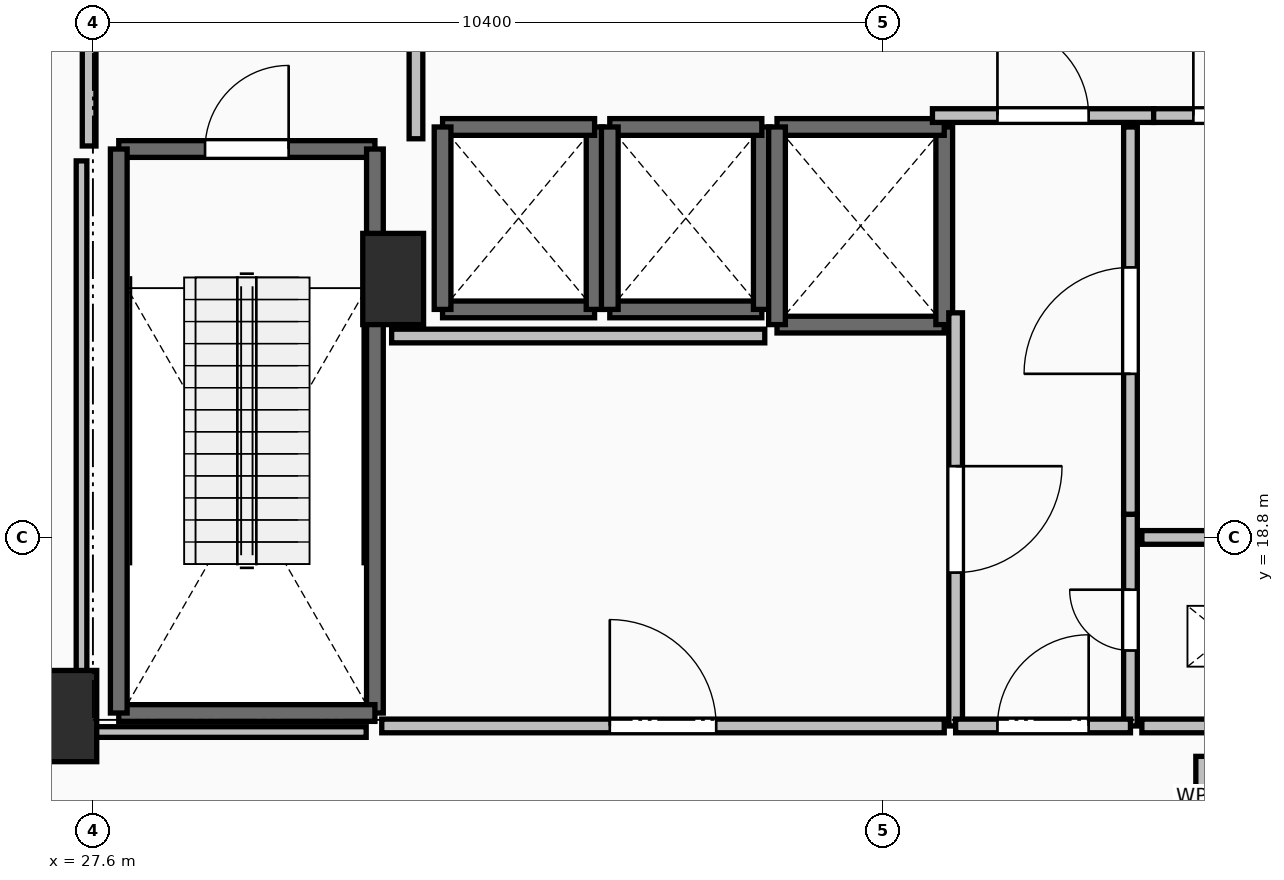
"""IFC4 building model, lengths in metres.
Left out: names, types, materials, properties, quantities, classifications, styles, units other than length and angle.
Written with IfcOpenShell. Run it as: python <this file> out.ifc"""

import sys

from ifc_helpers import new_model, si_unit, direction, frame, frame_2d, origin, origin_2d, place, context, subcontext, project, spatial, rectangle, extrude, element, fill, save


model = new_model("IFC4")
c1 = context("Model", 3, precision=1e-05, world=origin(), true_north=direction((0.0, 1.0)))
c2 = subcontext(c1, "Body", "Model", "MODEL_VIEW")
j1 = project(units=[si_unit("LENGTHUNIT", "METRE"), si_unit("PLANEANGLEUNIT", "RADIAN")], contexts=[c1])
p1 = place(None, origin())
s1 = spatial("IfcSite", under=j1, at=p1, CompositionType="ELEMENT")
p2 = place(p1, origin())
s2 = spatial("IfcBuilding", under=s1, at=p2, CompositionType="ELEMENT")
p3 = place(p2, frame((0.0, 0.0, 69.5)))
s3 = spatial("IfcBuildingStorey", under=s2, at=p3, CompositionType="ELEMENT", Elevation=69.5)
for number, where, z_axis, x_axis in (
    (1, (27.25, 16.45, 0.0), (0.0, 0.0, 1.0), (1.0, 0.0, 0.0)),
    (2, (31.55, 22.2, 0.0), (0.0, 0.0, 1.0), (1.0, 0.0, 0.0)),
):
    element("IfcColumn", number, at=place(p3, frame(where, z_axis=z_axis, x_axis=x_axis)), inside=s3, PredefinedType="PILASTER", context=c2, shape_type="SweptSolid", body=[
        extrude(rectangle(XDim=0.8, YDim=1.2, at=origin_2d()), origin(), (0.0, 0.0, 1.0), 4.8),
    ])
p4 = place(p3, frame((27.94, 23.91, 0.0), z_axis=(0.0, 0.0, 1.0), x_axis=(1.0, 0.0, 0.0)))
e3 = element("IfcWall", 3, at=p4, inside=s3, PredefinedType="SOLIDWALL", context=c2, shape_type="SweptSolid", body=[
    extrude(rectangle(XDim=3.37, YDim=0.22, at=frame_2d((1.685, 0.0))), origin(), (0.0, 0.0, 1.0), 4.5),
])
p5 = place(p4, frame((1.135, 0.0, 0.0)))
e4 = element("IfcOpeningElement", 4, at=p5, cuts=e3, PredefinedType="OPENING", context=c2, shape_type="SweptSolid", body=[
    extrude(rectangle(XDim=1.1, YDim=2.15, at=frame_2d((0.55, 1.075))), frame((0.0, 0.125, 0.0), z_axis=(0.0, -1.0, 0.0), x_axis=(1.0, 0.0, 0.0)), (0.0, 0.0, 1.0), 0.25),
])
p6 = place(p3, frame((31.31, 23.91, 0.0), z_axis=(0.0, 0.0, 1.0), x_axis=(0.0, -1.0, 0.0)))
e5 = element("IfcWall", 5, at=p6, inside=s3, PredefinedType="SOLIDWALL", context=c2, shape_type="SweptSolid", body=[
    extrude(rectangle(XDim=7.42, YDim=0.22, at=frame_2d((3.71, 0.0))), origin(), (0.0, 0.0, 1.0), 4.5),
])
p7 = place(p3, frame((31.31, 16.49, 0.0), z_axis=(0.0, 0.0, 1.0), x_axis=(-1.0, 0.0, 0.0)))
e6 = element("IfcWall", 6, at=p7, inside=s3, PredefinedType="SOLIDWALL", context=c2, shape_type="SweptSolid", body=[
    extrude(rectangle(XDim=3.37, YDim=0.22, at=frame_2d((1.685, 0.0))), origin(), (0.0, 0.0, 1.0), 4.5),
])
p8 = place(p3, frame((27.94, 16.49, 0.0), z_axis=(0.0, 0.0, 1.0), x_axis=(0.0, 1.0, 0.0)))
e7 = element("IfcWall", 7, at=p8, inside=s3, PredefinedType="SOLIDWALL", context=c2, shape_type="SweptSolid", body=[
    extrude(rectangle(XDim=7.42, YDim=0.22, at=frame_2d((3.71, 0.0))), origin(), (0.0, 0.0, 1.0), 4.5),
])
p9 = place(p3, frame((32.2, 21.8, 0.0), z_axis=(0.0, 0.0, 1.0), x_axis=(1.0, 0.0, 0.0)))
e8 = element("IfcWall", 8, at=p9, inside=s3, PredefinedType="SOLIDWALL", context=c2, shape_type="SweptSolid", body=[
    extrude(rectangle(XDim=2.0, YDim=0.22, at=frame_2d((1.0, 0.0))), origin(), (0.0, 0.0, 1.0), 4.5),
])
p10 = place(p3, frame((34.2, 21.8, 0.0), z_axis=(0.0, 0.0, 1.0), x_axis=(0.0, 1.0, 0.0)))
e9 = element("IfcWall", 9, at=p10, inside=s3, PredefinedType="SOLIDWALL", context=c2, shape_type="SweptSolid", body=[
    extrude(rectangle(XDim=2.4, YDim=0.22, at=frame_2d((1.2, 0.0))), origin(), (0.0, 0.0, 1.0), 4.5),
])
p11 = place(p3, frame((34.2, 24.2, 0.0), z_axis=(0.0, 0.0, 1.0), x_axis=(-1.0, 0.0, 0.0)))
e10 = element("IfcWall", 10, at=p11, inside=s3, PredefinedType="SOLIDWALL", context=c2, shape_type="SweptSolid", body=[
    extrude(rectangle(XDim=2.0, YDim=0.22, at=frame_2d((1.0, 0.0))), origin(), (0.0, 0.0, 1.0), 4.5),
])
p12 = place(p3, frame((32.2, 24.2, 0.0), z_axis=(0.0, 0.0, 1.0), x_axis=(0.0, -1.0, 0.0)))
e11 = element("IfcWall", 11, at=p12, inside=s3, PredefinedType="SOLIDWALL", context=c2, shape_type="SweptSolid", body=[
    extrude(rectangle(XDim=2.4, YDim=0.22, at=frame_2d((1.2, 0.0))), origin(), (0.0, 0.0, 1.0), 4.5),
])
p13 = place(p3, frame((34.4, 21.8, 0.0), z_axis=(0.0, 0.0, 1.0), x_axis=(1.0, 0.0, 0.0)))
e12 = element("IfcWall", 12, at=p13, inside=s3, PredefinedType="SOLIDWALL", context=c2, shape_type="SweptSolid", body=[
    extrude(rectangle(XDim=2.0, YDim=0.22, at=frame_2d((1.0, 0.0))), origin(), (0.0, 0.0, 1.0), 4.5),
])
p14 = place(p3, frame((36.4, 21.8, 0.0), z_axis=(0.0, 0.0, 1.0), x_axis=(0.0, 1.0, 0.0)))
e13 = element("IfcWall", 13, at=p14, inside=s3, PredefinedType="SOLIDWALL", context=c2, shape_type="SweptSolid", body=[
    extrude(rectangle(XDim=2.4, YDim=0.22, at=frame_2d((1.2, 0.0))), origin(), (0.0, 0.0, 1.0), 4.5),
])
p15 = place(p3, frame((36.4, 24.2, 0.0), z_axis=(0.0, 0.0, 1.0), x_axis=(-1.0, 0.0, 0.0)))
e14 = element("IfcWall", 14, at=p15, inside=s3, PredefinedType="SOLIDWALL", context=c2, shape_type="SweptSolid", body=[
    extrude(rectangle(XDim=2.0, YDim=0.22, at=frame_2d((1.0, 0.0))), origin(), (0.0, 0.0, 1.0), 4.5),
])
p16 = place(p3, frame((34.4, 24.2, 0.0), z_axis=(0.0, 0.0, 1.0), x_axis=(0.0, -1.0, 0.0)))
e15 = element("IfcWall", 15, at=p16, inside=s3, PredefinedType="SOLIDWALL", context=c2, shape_type="SweptSolid", body=[
    extrude(rectangle(XDim=2.4, YDim=0.22, at=frame_2d((1.2, 0.0))), origin(), (0.0, 0.0, 1.0), 4.5),
])
p17 = place(p3, frame((36.6, 21.6, 0.0), z_axis=(0.0, 0.0, 1.0), x_axis=(1.0, 0.0, 0.0)))
e16 = element("IfcWall", 16, at=p17, inside=s3, PredefinedType="SOLIDWALL", context=c2, shape_type="SweptSolid", body=[
    extrude(rectangle(XDim=2.2, YDim=0.22, at=frame_2d((1.1, 0.0))), origin(), (0.0, 0.0, 1.0), 4.5),
])
p18 = place(p3, frame((38.8, 21.6, 0.0), z_axis=(0.0, 0.0, 1.0), x_axis=(0.0, 1.0, 0.0)))
e17 = element("IfcWall", 17, at=p18, inside=s3, PredefinedType="SOLIDWALL", context=c2, shape_type="SweptSolid", body=[
    extrude(rectangle(XDim=2.6, YDim=0.22, at=frame_2d((1.3, 0.0))), origin(), (0.0, 0.0, 1.0), 4.5),
])
p19 = place(p3, frame((38.8, 24.2, 0.0), z_axis=(0.0, 0.0, 1.0), x_axis=(-1.0, 0.0, 0.0)))
e18 = element("IfcWall", 18, at=p19, inside=s3, PredefinedType="SOLIDWALL", context=c2, shape_type="SweptSolid", body=[
    extrude(rectangle(XDim=2.2, YDim=0.22, at=frame_2d((1.1, 0.0))), origin(), (0.0, 0.0, 1.0), 4.5),
])
p20 = place(p3, frame((36.6, 24.2, 0.0), z_axis=(0.0, 0.0, 1.0), x_axis=(0.0, -1.0, 0.0)))
e19 = element("IfcWall", 19, at=p20, inside=s3, PredefinedType="SOLIDWALL", context=c2, shape_type="SweptSolid", body=[
    extrude(rectangle(XDim=2.6, YDim=0.22, at=frame_2d((1.3, 0.0))), origin(), (0.0, 0.0, 1.0), 4.5),
])
p21 = place(p3, frame((31.85, 24.045, 0.0), z_axis=(0.0, 0.0, 1.0), x_axis=(0.0, 1.0, 0.0)))
e20 = element("IfcWall", 20, at=p21, inside=s3, PredefinedType="PARTITIONING", context=c2, shape_type="SweptSolid", body=[
    extrude(rectangle(XDim=3.91, YDim=0.18, at=frame_2d((1.955, 0.0))), origin(), (0.0, 0.0, 1.0), 4.5),
])
p22 = place(p21, frame((1.355, 0.0, 0.0)))
e21 = element("IfcOpeningElement", 21, at=p22, cuts=e20, PredefinedType="OPENING", context=c2, shape_type="SweptSolid", body=[
    extrude(rectangle(XDim=1.2, YDim=2.15, at=frame_2d((0.6, 1.075))), frame((0.0, 0.105, 0.0), z_axis=(0.0, -1.0, 0.0), x_axis=(1.0, 0.0, 0.0)), (0.0, 0.0, 1.0), 0.21),
])
p23 = place(p3, frame((27.55, 28.0, 0.0), z_axis=(0.0, 0.0, 1.0), x_axis=(0.0, -1.0, 0.0)))
e22 = element("IfcWall", 22, at=p23, inside=s3, PredefinedType="PARTITIONING", context=c2, shape_type="SweptSolid", body=[
    extrude(rectangle(XDim=4.05, YDim=0.18, at=frame_2d((2.025, 0.0))), origin(), (0.0, 0.0, 1.0), 3.482),
])
p24 = place(p23, frame((1.425, 0.0, 0.0)))
e23 = element("IfcOpeningElement", 23, at=p24, cuts=e22, PredefinedType="OPENING", context=c2, shape_type="SweptSolid", body=[
    extrude(rectangle(XDim=1.2, YDim=2.15, at=frame_2d((0.6, 1.075))), frame((0.0, 0.105, 0.0), z_axis=(0.0, -1.0, 0.0), x_axis=(1.0, 0.0, 0.0)), (0.0, 0.0, 1.0), 0.21),
])
p25 = place(p3, frame((38.645, 24.35, 0.0), z_axis=(0.0, 0.0, 1.0), x_axis=(1.0, 0.0, 0.0)))
e24 = element("IfcWall", 24, at=p25, inside=s3, PredefinedType="PARTITIONING", context=c2, shape_type="SweptSolid", body=[
    extrude(rectangle(XDim=2.91, YDim=0.18, at=frame_2d((1.455, 0.0))), origin(), (0.0, 0.0, 1.0), 4.5),
])
p26 = place(p25, frame((0.855, 0.0, 0.0)))
e25 = element("IfcOpeningElement", 25, at=p26, cuts=e24, PredefinedType="OPENING", context=c2, shape_type="SweptSolid", body=[
    extrude(rectangle(XDim=1.2, YDim=2.15, at=frame_2d((0.6, 1.075))), frame((0.0, 0.105, 0.0), z_axis=(0.0, -1.0, 0.0), x_axis=(1.0, 0.0, 0.0)), (0.0, 0.0, 1.0), 0.21),
])
p27 = place(p3, frame((41.555, 24.35, 0.0), z_axis=(0.0, 0.0, 1.0), x_axis=(1.0, 0.0, 0.0)))
e26 = element("IfcWall", 26, at=p27, inside=s3, PredefinedType="PARTITIONING", context=c2, shape_type="SweptSolid", body=[
    extrude(rectangle(XDim=2.445, YDim=0.18, at=frame_2d((1.223, 0.0))), origin(), (0.0, 0.0, 1.0), 4.5),
])
p28 = place(p27, frame((0.522, 0.0, 0.0)))
e27 = element("IfcOpeningElement", 27, at=p28, cuts=e26, PredefinedType="OPENING", context=c2, shape_type="SweptSolid", body=[
    extrude(rectangle(XDim=1.4, YDim=2.2, at=frame_2d((0.7, 1.1))), frame((0.0, 0.105, 0.0), z_axis=(0.0, -1.0, 0.0), x_axis=(1.0, 0.0, 0.0)), (0.0, 0.0, 1.0), 0.21),
])
p29 = place(p3, frame((38.95, 21.755, 0.0), z_axis=(0.0, 0.0, 1.0), x_axis=(0.0, -1.0, 0.0)))
e28 = element("IfcWall", 28, at=p29, inside=s3, PredefinedType="PARTITIONING", context=c2, shape_type="SweptSolid", body=[
    extrude(rectangle(XDim=5.435, YDim=0.18, at=frame_2d((2.717, 0.0))), origin(), (0.0, 0.0, 1.0), 4.5),
])
p30 = place(p29, frame((2.018, 0.0, 0.0)))
e29 = element("IfcOpeningElement", 29, at=p30, cuts=e28, PredefinedType="OPENING", context=c2, shape_type="SweptSolid", body=[
    extrude(rectangle(XDim=1.4, YDim=2.2, at=frame_2d((0.7, 1.1))), frame((0.0, 0.105, 0.0), z_axis=(0.0, -1.0, 0.0), x_axis=(1.0, 0.0, 0.0)), (0.0, 0.0, 1.0), 0.21),
])
p31 = place(p3, frame((41.25, 16.32, 0.0), z_axis=(0.0, 0.0, 1.0), x_axis=(0.0, 1.0, 0.0)))
e30 = element("IfcWall", 30, at=p31, inside=s3, PredefinedType="PARTITIONING", context=c2, shape_type="SweptSolid", body=[
    extrude(rectangle(XDim=2.785, YDim=0.18, at=frame_2d((1.393, 0.0))), origin(), (0.0, 0.0, 1.0), 4.5),
])
p32 = place(p31, frame((0.992, 0.0, 0.0)))
e31 = element("IfcOpeningElement", 31, at=p32, cuts=e30, PredefinedType="OPENING", context=c2, shape_type="SweptSolid", body=[
    extrude(rectangle(XDim=0.8, YDim=2.05, at=frame_2d((0.4, 1.025))), frame((0.0, 0.105, 0.0), z_axis=(0.0, -1.0, 0.0), x_axis=(1.0, 0.0, 0.0)), (0.0, 0.0, 1.0), 0.21),
])
p33 = place(p3, frame((41.25, 19.105, 0.0), z_axis=(0.0, 0.0, 1.0), x_axis=(0.0, 1.0, 0.0)))
e32 = element("IfcWall", 32, at=p33, inside=s3, PredefinedType="PARTITIONING", context=c2, shape_type="SweptSolid", body=[
    extrude(rectangle(XDim=5.095, YDim=0.18, at=frame_2d((2.547, 0.0))), origin(), (0.0, 0.0, 1.0), 4.5),
])
p34 = place(p33, frame((1.847, 0.0, 0.0)))
e33 = element("IfcOpeningElement", 33, at=p34, cuts=e32, PredefinedType="OPENING", context=c2, shape_type="SweptSolid", body=[
    extrude(rectangle(XDim=1.4, YDim=2.2, at=frame_2d((0.7, 1.1))), frame((0.0, 0.105, 0.0), z_axis=(0.0, -1.0, 0.0), x_axis=(1.0, 0.0, 0.0)), (0.0, 0.0, 1.0), 0.21),
])
p35 = place(p3, frame((38.95, 16.32, 0.0), z_axis=(0.0, 0.0, 1.0), x_axis=(1.0, 0.0, 0.0)))
e34 = element("IfcWall", 34, at=p35, inside=s3, PredefinedType="PARTITIONING", context=c2, shape_type="SweptSolid", body=[
    extrude(rectangle(XDim=2.3, YDim=0.18, at=frame_2d((1.15, 0.0))), origin(), (0.0, 0.0, 1.0), 4.5),
])
p36 = place(p35, frame((0.55, 0.0, 0.0)))
e35 = element("IfcOpeningElement", 35, at=p36, cuts=e34, PredefinedType="OPENING", context=c2, shape_type="SweptSolid", body=[
    extrude(rectangle(XDim=1.2, YDim=2.15, at=frame_2d((0.6, 1.075))), frame((0.0, 0.105, 0.0), z_axis=(0.0, -1.0, 0.0), x_axis=(1.0, 0.0, 0.0)), (0.0, 0.0, 1.0), 0.21),
])
p37 = place(p3, frame((31.4, 16.32, 0.0), z_axis=(0.0, 0.0, 1.0), x_axis=(1.0, 0.0, 0.0)))
e36 = element("IfcWall", 36, at=p37, inside=s3, PredefinedType="PARTITIONING", context=c2, shape_type="SweptSolid", body=[
    extrude(rectangle(XDim=7.4, YDim=0.18, at=frame_2d((3.7, 0.0))), origin(), (0.0, 0.0, 1.0), 4.5),
])
p38 = place(p37, frame((3.0, 0.0, 0.0)))
e37 = element("IfcOpeningElement", 37, at=p38, cuts=e36, PredefinedType="OPENING", context=c2, shape_type="SweptSolid", body=[
    extrude(rectangle(XDim=1.4, YDim=2.2, at=frame_2d((0.7, 1.1))), frame((0.0, 0.105, 0.0), z_axis=(0.0, -1.0, 0.0), x_axis=(1.0, 0.0, 0.0)), (0.0, 0.0, 1.0), 0.21),
])
p39 = place(p3, frame((44.6, 18.8, 0.0), z_axis=(0.0, 0.0, 1.0), x_axis=(-1.0, 0.0, 0.0)))
e38 = element("IfcWall", 38, at=p39, inside=s3, PredefinedType="PARTITIONING", context=c2, shape_type="SweptSolid", body=[
    extrude(rectangle(XDim=3.2, YDim=0.18, at=frame_2d((1.6, 0.0))), origin(), (0.0, 0.0, 1.0), 4.5),
])
p40 = place(p3, frame((41.4, 16.32, 0.0), z_axis=(0.0, 0.0, 1.0), x_axis=(1.0, 0.0, 0.0)))
e39 = element("IfcWall", 39, at=p40, inside=s3, PredefinedType="PARTITIONING", context=c2, shape_type="SweptSolid", body=[
    extrude(rectangle(XDim=3.2, YDim=0.18, at=frame_2d((1.6, 0.0))), origin(), (0.0, 0.0, 1.0), 4.5),
])
p41 = place(p40, frame((1.2, 0.0, 0.0)))
e40 = element("IfcOpeningElement", 40, at=p41, cuts=e39, PredefinedType="OPENING", context=c2, shape_type="SweptSolid", body=[
    extrude(rectangle(XDim=0.8, YDim=2.05, at=frame_2d((0.4, 1.025))), frame((0.0, 0.105, 0.0), z_axis=(0.0, -1.0, 0.0), x_axis=(1.0, 0.0, 0.0)), (0.0, 0.0, 1.0), 0.21),
])
p42 = place(p3, frame((42.2, 14.1, 0.0), z_axis=(0.0, 0.0, 1.0), x_axis=(0.0, 1.0, 0.0)))
e41 = element("IfcWall", 41, at=p42, inside=s3, PredefinedType="PARTITIONING", context=c2, shape_type="SweptSolid", body=[
    extrude(rectangle(XDim=1.82, YDim=0.18, at=frame_2d((0.91, 0.0))), origin(), (0.0, 0.0, 1.0), 4.5),
])
p43 = place(p3, frame((36.439, 21.45, 0.0), z_axis=(0.0, 0.0, 1.0), x_axis=(-1.0, 0.0, 0.0)))
e42 = element("IfcWall", 42, at=p43, inside=s3, PredefinedType="PARTITIONING", context=c2, shape_type="SweptSolid", body=[
    extrude(rectangle(XDim=4.909, YDim=0.18, at=frame_2d((2.455, 0.0))), origin(), (0.0, 0.0, 1.0), 4.5),
])
p44 = place(p3, frame((31.195, 16.24, 0.0), z_axis=(0.0, 0.0, 1.0), x_axis=(-1.0, 0.0, 0.0)))
e43 = element("IfcWall", 43, at=p44, inside=s3, PredefinedType="PARTITIONING", context=c2, shape_type="SweptSolid", body=[
    extrude(rectangle(XDim=3.745, YDim=0.14, at=frame_2d((1.873, 0.0))), origin(), (0.0, 0.0, 1.0), 3.482),
])
p45 = place(p3, frame((27.45, 16.24, 0.0), z_axis=(0.0, 0.0, 1.0), x_axis=(0.0, 1.0, 0.0)))
e44 = element("IfcWall", 44, at=p45, inside=s3, PredefinedType="PARTITIONING", context=c2, shape_type="SweptSolid", body=[
    extrude(rectangle(XDim=7.514, YDim=0.14, at=frame_2d((3.757, 0.0))), origin(), (0.0, 0.0, 1.0), 3.482),
])
p46 = place(p5, origin())
e45 = element("IfcDoor", 45, at=p46, inside=s3, OperationType="SINGLE_SWING_RIGHT", PredefinedType="DOOR", context=c2, shape_type="SweptSolid", body=[
    extrude(rectangle(XDim=1.1, YDim=2.15, at=frame_2d((0.55, 1.075))), frame((0.0, 0.025, 0.0), z_axis=(0.0, -1.0, 0.0), x_axis=(1.0, 0.0, 0.0)), (0.0, 0.0, 1.0), 0.05),
])
fill(e4, e45)
p47 = place(p26, origin())
e46 = element("IfcDoor", 46, at=p47, inside=s3, OperationType="SINGLE_SWING_LEFT", PredefinedType="DOOR", context=c2, shape_type="SweptSolid", body=[
    extrude(rectangle(XDim=1.2, YDim=2.15, at=frame_2d((0.6, 1.075))), frame((0.0, 0.025, 0.0), z_axis=(0.0, -1.0, 0.0), x_axis=(1.0, 0.0, 0.0)), (0.0, 0.0, 1.0), 0.05),
])
fill(e25, e46)
p48 = place(p28, origin())
e47 = element("IfcDoor", 47, at=p48, inside=s3, OperationType="DOUBLE_SWING_LEFT", PredefinedType="DOOR", context=c2, shape_type="SweptSolid", body=[
    extrude(rectangle(XDim=1.4, YDim=2.2, at=frame_2d((0.7, 1.1))), frame((0.0, 0.025, 0.0), z_axis=(0.0, -1.0, 0.0), x_axis=(1.0, 0.0, 0.0)), (0.0, 0.0, 1.0), 0.05),
])
fill(e27, e47)
p49 = place(p30, origin())
e48 = element("IfcDoor", 48, at=p49, inside=s3, OperationType="DOUBLE_SWING_LEFT", PredefinedType="DOOR", context=c2, shape_type="SweptSolid", body=[
    extrude(rectangle(XDim=1.4, YDim=2.2, at=frame_2d((0.7, 1.1))), frame((0.0, 0.025, 0.0), z_axis=(0.0, -1.0, 0.0), x_axis=(1.0, 0.0, 0.0)), (0.0, 0.0, 1.0), 0.05),
])
fill(e29, e48)
p50 = place(p32, origin())
e49 = element("IfcDoor", 49, at=p50, inside=s3, OperationType="SINGLE_SWING_RIGHT", PredefinedType="DOOR", context=c2, shape_type="SweptSolid", body=[
    extrude(rectangle(XDim=0.8, YDim=2.05, at=frame_2d((0.4, 1.025))), frame((0.0, 0.025, 0.0), z_axis=(0.0, -1.0, 0.0), x_axis=(1.0, 0.0, 0.0)), (0.0, 0.0, 1.0), 0.05),
])
fill(e31, e49)
p51 = place(p34, origin())
e50 = element("IfcDoor", 50, at=p51, inside=s3, OperationType="DOUBLE_SWING_LEFT", PredefinedType="DOOR", context=c2, shape_type="SweptSolid", body=[
    extrude(rectangle(XDim=1.4, YDim=2.2, at=frame_2d((0.7, 1.1))), frame((0.0, 0.025, 0.0), z_axis=(0.0, -1.0, 0.0), x_axis=(1.0, 0.0, 0.0)), (0.0, 0.0, 1.0), 0.05),
])
fill(e33, e50)
p52 = place(p36, origin())
e51 = element("IfcDoor", 51, at=p52, inside=s3, OperationType="SINGLE_SWING_RIGHT", PredefinedType="DOOR", context=c2, shape_type="SweptSolid", body=[
    extrude(rectangle(XDim=1.2, YDim=2.15, at=frame_2d((0.6, 1.075))), frame((0.0, 0.025, 0.0), z_axis=(0.0, -1.0, 0.0), x_axis=(1.0, 0.0, 0.0)), (0.0, 0.0, 1.0), 0.05),
])
fill(e35, e51)
p53 = place(p38, origin())
e52 = element("IfcDoor", 52, at=p53, inside=s3, OperationType="DOUBLE_SWING_LEFT", PredefinedType="DOOR", context=c2, shape_type="SweptSolid", body=[
    extrude(rectangle(XDim=1.4, YDim=2.2, at=frame_2d((0.7, 1.1))), frame((0.0, 0.025, 0.0), z_axis=(0.0, -1.0, 0.0), x_axis=(1.0, 0.0, 0.0)), (0.0, 0.0, 1.0), 0.05),
])
fill(e37, e52)
save(model, sys.argv[1])
